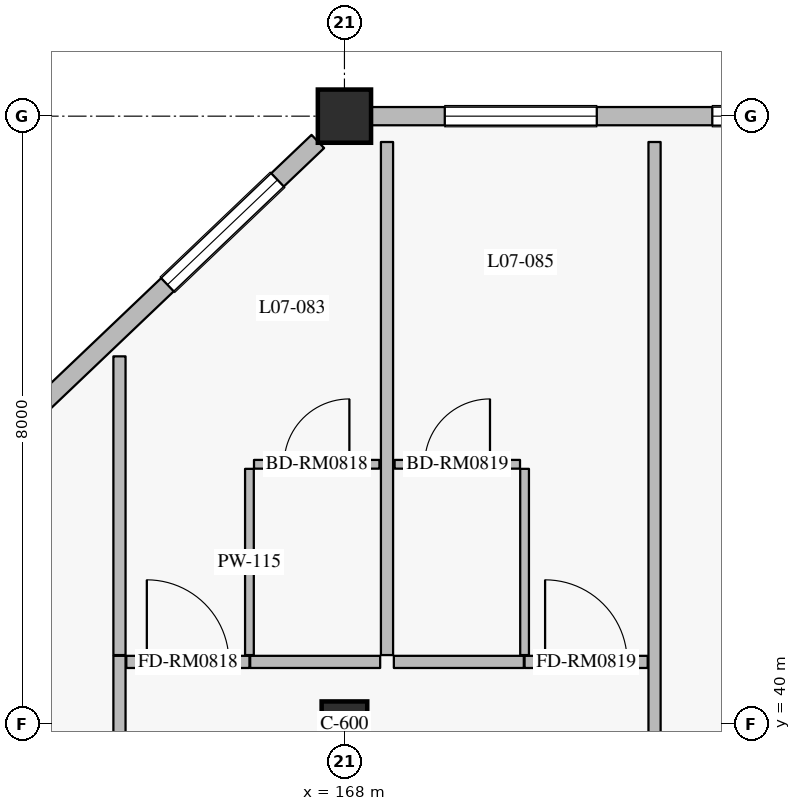
"""IFC4 building model, lengths in metres.
Left out: names, types, materials, properties, quantities, classifications, styles, units other than length and angle.
Written with IfcOpenShell. Run it as: python <this file> out.ifc"""

import sys

from ifc_helpers import new_model, si_unit, direction, frame, frame_2d, origin, origin_2d, place, context, subcontext, project, spatial, rectangle, extrude, element, fill, save


model = new_model("IFC4")
c1 = context("Model", 3, precision=1e-05, world=origin(), true_north=direction((0.0, 1.0)))
c2 = subcontext(c1, "Body", "Model", "MODEL_VIEW")
j1 = project(units=[si_unit("LENGTHUNIT", "METRE"), si_unit("PLANEANGLEUNIT", "RADIAN")], contexts=[c1])
p1 = place(None, origin())
s1 = spatial("IfcSite", under=j1, at=p1, CompositionType="ELEMENT")
p2 = place(p1, origin())
s2 = spatial("IfcBuilding", under=s1, at=p2, CompositionType="ELEMENT")
p3 = place(p2, frame((0.0, 0.0, 32.4)))
s3 = spatial("IfcBuildingStorey", under=s2, at=p3, CompositionType="ELEMENT", Elevation=32.4)
p4 = place(p3, frame((168.0, 48.0, 0.0), z_axis=(0.0, 0.0, 1.0), x_axis=(1.0, 0.0, 0.0)))
e1 = element("IfcColumn", 1, at=p4, inside=s3, PredefinedType="COLUMN", context=c2, shape_type="SweptSolid", body=[
    extrude(rectangle(XDim=0.7, YDim=0.7, at=origin_2d()), origin(), (0.0, 0.0, 1.0), 3.6),
])
p5 = place(p3, frame((168.0, 40.0, 0.0), z_axis=(0.0, 0.0, 1.0), x_axis=(1.0, 0.0, 0.0)))
e2 = element("IfcColumn", 2, at=p5, inside=s3, PredefinedType="COLUMN", context=c2, shape_type="SweptSolid", body=[
    extrude(rectangle(XDim=0.6, YDim=0.6, at=origin_2d()), origin(), (0.0, 0.0, 1.0), 3.6),
])
p6 = place(p3, frame((159.95, 40.333, 0.0), z_axis=(0.0, 0.0, 1.0), x_axis=(0.724105170588, 0.689689569247, 0.0)))
e3 = element("IfcWall", 3, at=p6, inside=s3, PredefinedType="SOLIDWALL", context=c2, shape_type="SweptSolid", body=[
    extrude(rectangle(XDim=10.634, YDim=0.24, at=frame_2d((5.317, 0.0))), origin(), (0.0, 0.0, 1.0), 2.89),
])
p7 = place(p6, frame((0.215, 0.0, 0.8)))
e4 = element("IfcOpeningElement", 4, at=p7, cuts=e3, PredefinedType="OPENING", context=c2, shape_type="SweptSolid", body=[
    extrude(rectangle(XDim=1.6, YDim=1.6, at=frame_2d((0.8, 0.8))), frame((0.0, 0.13, 0.0), z_axis=(0.0, -1.0, 0.0), x_axis=(1.0, 0.0, 0.0)), (0.0, 0.0, 1.0), 0.26),
])
p8 = place(p6, frame((3.599, 0.0, 0.8)))
e5 = element("IfcOpeningElement", 5, at=p8, cuts=e3, PredefinedType="OPENING", context=c2, shape_type="SweptSolid", body=[
    extrude(rectangle(XDim=2.0, YDim=1.75, at=frame_2d((1.0, 0.875))), frame((0.0, 0.13, 0.0), z_axis=(0.0, -1.0, 0.0), x_axis=(1.0, 0.0, 0.0)), (0.0, 0.0, 1.0), 0.26),
])
p9 = place(p6, frame((7.901, 0.0, 0.8)))
e6 = element("IfcOpeningElement", 6, at=p9, cuts=e3, PredefinedType="OPENING", context=c2, shape_type="SweptSolid", body=[
    extrude(rectangle(XDim=2.0, YDim=1.75, at=frame_2d((1.0, 0.875))), frame((0.0, 0.13, 0.0), z_axis=(0.0, -1.0, 0.0), x_axis=(1.0, 0.0, 0.0)), (0.0, 0.0, 1.0), 0.26),
])
p10 = place(p3, frame((168.35, 48.0, 0.0), z_axis=(0.0, 0.0, 1.0), x_axis=(1.0, 0.0, 0.0)))
e7 = element("IfcWall", 7, at=p10, inside=s3, PredefinedType="SOLIDWALL", context=c2, shape_type="SweptSolid", body=[
    extrude(rectangle(XDim=7.7, YDim=0.24, at=frame_2d((3.85, 0.0))), origin(), (0.0, 0.0, 1.0), 2.89),
])
p11 = place(p10, frame((0.97, 0.0, 0.8)))
e8 = element("IfcOpeningElement", 8, at=p11, cuts=e7, PredefinedType="OPENING", context=c2, shape_type="SweptSolid", body=[
    extrude(rectangle(XDim=2.0, YDim=1.75, at=frame_2d((1.0, 0.875))), frame((0.0, 0.13, 0.0), z_axis=(0.0, -1.0, 0.0), x_axis=(1.0, 0.0, 0.0)), (0.0, 0.0, 1.0), 0.26),
])
p12 = place(p10, frame((4.49, 0.0, 0.8)))
e9 = element("IfcOpeningElement", 9, at=p12, cuts=e7, PredefinedType="OPENING", context=c2, shape_type="SweptSolid", body=[
    extrude(rectangle(XDim=2.0, YDim=1.75, at=frame_2d((1.0, 0.875))), frame((0.0, 0.13, 0.0), z_axis=(0.0, -1.0, 0.0), x_axis=(1.0, 0.0, 0.0)), (0.0, 0.0, 1.0), 0.26),
])
p13 = place(p3, frame((165.04, 32.26, 0.0), z_axis=(0.0, 0.0, 1.0), x_axis=(0.0, 1.0, 0.0)))
e10 = element("IfcWall", 10, at=p13, inside=s3, PredefinedType="PARTITIONING", context=c2, shape_type="SweptSolid", body=[
    extrude(rectangle(XDim=8.64, YDim=0.16, at=frame_2d((4.32, 0.0))), origin(), (0.0, 0.0, 1.0), 3.335),
])
p14 = place(p3, frame((165.13, 40.82, 0.0), z_axis=(0.0, 0.0, 1.0), x_axis=(1.0, 0.0, 0.0)))
e11 = element("IfcWall", 11, at=p14, inside=s3, PredefinedType="PARTITIONING", context=c2, shape_type="SweptSolid", body=[
    extrude(rectangle(XDim=1.62, YDim=0.16, at=frame_2d((0.81, 0.0))), origin(), (0.0, 0.0, 1.0), 3.335),
])
p15 = place(p14, frame((0.27, 0.0, 0.0)))
e12 = element("IfcOpeningElement", 12, at=p15, cuts=e11, PredefinedType="OPENING", context=c2, shape_type="SweptSolid", body=[
    extrude(rectangle(XDim=1.08, YDim=2.3, at=frame_2d((0.54, 1.15))), frame((0.0, 0.09, 0.0), z_axis=(0.0, -1.0, 0.0), x_axis=(1.0, 0.0, 0.0)), (0.0, 0.0, 1.0), 0.18),
])
p16 = place(p3, frame((166.76, 40.82, 0.0), z_axis=(0.0, 0.0, 1.0), x_axis=(1.0, 0.0, 0.0)))
e13 = element("IfcWall", 13, at=p16, inside=s3, PredefinedType="PARTITIONING", context=c2, shape_type="SweptSolid", body=[
    extrude(rectangle(XDim=1.71, YDim=0.16, at=frame_2d((0.855, 0.0))), origin(), (0.0, 0.0, 1.0), 3.335),
])
p17 = place(p3, frame((166.75, 40.91, 0.0), z_axis=(0.0, 0.0, 1.0), x_axis=(0.0, 1.0, 0.0)))
e14 = element("IfcWall", 14, at=p17, inside=s3, PredefinedType="PARTITIONING", context=c2, shape_type="SweptSolid", body=[
    extrude(rectangle(XDim=2.45, YDim=0.115, at=frame_2d((1.225, 0.0))), origin(), (0.0, 0.0, 1.0), 3.335),
])
p18 = place(p3, frame((166.81, 43.42, 0.0), z_axis=(0.0, 0.0, 1.0), x_axis=(1.0, 0.0, 0.0)))
e15 = element("IfcWall", 15, at=p18, inside=s3, PredefinedType="PARTITIONING", context=c2, shape_type="SweptSolid", body=[
    extrude(rectangle(XDim=1.65, YDim=0.115, at=frame_2d((0.825, 0.0))), origin(), (0.0, 0.0, 1.0), 3.335),
])
p19 = place(p18, frame((0.395, 0.0, 0.0)))
e16 = element("IfcOpeningElement", 16, at=p19, cuts=e15, PredefinedType="OPENING", context=c2, shape_type="SweptSolid", body=[
    extrude(rectangle(XDim=0.86, YDim=2.12, at=frame_2d((0.43, 1.06))), frame((0.0, 0.067, 0.0), z_axis=(0.0, -1.0, 0.0), x_axis=(1.0, 0.0, 0.0)), (0.0, 0.0, 1.0), 0.135),
])
p20 = place(p3, frame((165.04, 40.91, 0.0), z_axis=(0.0, 0.0, 1.0), x_axis=(0.0, 1.0, 0.0)))
e17 = element("IfcWall", 17, at=p20, inside=s3, PredefinedType="PARTITIONING", context=c2, shape_type="SweptSolid", body=[
    extrude(rectangle(XDim=3.93, YDim=0.16, at=frame_2d((1.965, 0.0))), origin(), (0.0, 0.0, 1.0), 3.335),
])
p21 = place(p3, frame((168.65, 40.82, 0.0), z_axis=(0.0, 0.0, 1.0), x_axis=(1.0, 0.0, 0.0)))
e18 = element("IfcWall", 18, at=p21, inside=s3, PredefinedType="PARTITIONING", context=c2, shape_type="SweptSolid", body=[
    extrude(rectangle(XDim=1.71, YDim=0.16, at=frame_2d((0.855, 0.0))), origin(), (0.0, 0.0, 1.0), 3.335),
])
p22 = place(p3, frame((170.37, 40.82, 0.0), z_axis=(0.0, 0.0, 1.0), x_axis=(1.0, 0.0, 0.0)))
e19 = element("IfcWall", 19, at=p22, inside=s3, PredefinedType="PARTITIONING", context=c2, shape_type="SweptSolid", body=[
    extrude(rectangle(XDim=1.62, YDim=0.16, at=frame_2d((0.81, 0.0))), origin(), (0.0, 0.0, 1.0), 3.335),
])
p23 = place(p22, frame((0.27, 0.0, 0.0)))
e20 = element("IfcOpeningElement", 20, at=p23, cuts=e19, PredefinedType="OPENING", context=c2, shape_type="SweptSolid", body=[
    extrude(rectangle(XDim=1.08, YDim=2.3, at=frame_2d((0.54, 1.15))), frame((0.0, 0.09, 0.0), z_axis=(0.0, -1.0, 0.0), x_axis=(1.0, 0.0, 0.0)), (0.0, 0.0, 1.0), 0.18),
])
p24 = place(p3, frame((170.37, 40.91, 0.0), z_axis=(0.0, 0.0, 1.0), x_axis=(0.0, 1.0, 0.0)))
e21 = element("IfcWall", 21, at=p24, inside=s3, PredefinedType="PARTITIONING", context=c2, shape_type="SweptSolid", body=[
    extrude(rectangle(XDim=2.45, YDim=0.115, at=frame_2d((1.225, 0.0))), origin(), (0.0, 0.0, 1.0), 3.335),
])
p25 = place(p3, frame((168.66, 43.42, 0.0), z_axis=(0.0, 0.0, 1.0), x_axis=(1.0, 0.0, 0.0)))
e22 = element("IfcWall", 22, at=p25, inside=s3, PredefinedType="PARTITIONING", context=c2, shape_type="SweptSolid", body=[
    extrude(rectangle(XDim=1.65, YDim=0.115, at=frame_2d((0.825, 0.0))), origin(), (0.0, 0.0, 1.0), 3.335),
])
p26 = place(p25, frame((0.395, 0.0, 0.0)))
e23 = element("IfcOpeningElement", 23, at=p26, cuts=e22, PredefinedType="OPENING", context=c2, shape_type="SweptSolid", body=[
    extrude(rectangle(XDim=0.86, YDim=2.12, at=frame_2d((0.43, 1.06))), frame((0.0, 0.067, 0.0), z_axis=(0.0, -1.0, 0.0), x_axis=(1.0, 0.0, 0.0)), (0.0, 0.0, 1.0), 0.135),
])
p27 = place(p3, frame((168.56, 40.91, 0.0), z_axis=(0.0, 0.0, 1.0), x_axis=(0.0, 1.0, 0.0)))
e24 = element("IfcWall", 24, at=p27, inside=s3, PredefinedType="PARTITIONING", context=c2, shape_type="SweptSolid", body=[
    extrude(rectangle(XDim=6.75, YDim=0.16, at=frame_2d((3.375, 0.0))), origin(), (0.0, 0.0, 1.0), 3.335),
])
p28 = place(p3, frame((172.08, 38.75, 0.0), z_axis=(0.0, 0.0, 1.0), x_axis=(0.0, 1.0, 0.0)))
e25 = element("IfcWall", 25, at=p28, inside=s3, PredefinedType="PARTITIONING", context=c2, shape_type="SweptSolid", body=[
    extrude(rectangle(XDim=8.91, YDim=0.16, at=frame_2d((4.455, 0.0))), origin(), (0.0, 0.0, 1.0), 3.335),
])
p29 = place(p9, origin())
e26 = element("IfcWindow", 26, at=p29, inside=s3, PartitioningType="DOUBLE_PANEL_VERTICAL", PredefinedType="WINDOW", context=c2, shape_type="SweptSolid", body=[
    extrude(rectangle(XDim=2.0, YDim=1.75, at=frame_2d((1.0, 0.875))), frame((0.0, 0.03, 0.0), z_axis=(0.0, -1.0, 0.0), x_axis=(1.0, 0.0, 0.0)), (0.0, 0.0, 1.0), 0.06),
])
fill(e6, e26)
p30 = place(p11, origin())
e27 = element("IfcWindow", 27, at=p30, inside=s3, PartitioningType="DOUBLE_PANEL_VERTICAL", PredefinedType="WINDOW", context=c2, shape_type="SweptSolid", body=[
    extrude(rectangle(XDim=2.0, YDim=1.75, at=frame_2d((1.0, 0.875))), frame((0.0, 0.03, 0.0), z_axis=(0.0, -1.0, 0.0), x_axis=(1.0, 0.0, 0.0)), (0.0, 0.0, 1.0), 0.06),
])
fill(e8, e27)
p31 = place(p12, origin())
e28 = element("IfcWindow", 28, at=p31, inside=s3, PartitioningType="DOUBLE_PANEL_VERTICAL", PredefinedType="WINDOW", context=c2, shape_type="SweptSolid", body=[
    extrude(rectangle(XDim=2.0, YDim=1.75, at=frame_2d((1.0, 0.875))), frame((0.0, 0.03, 0.0), z_axis=(0.0, -1.0, 0.0), x_axis=(1.0, 0.0, 0.0)), (0.0, 0.0, 1.0), 0.06),
])
fill(e9, e28)
p32 = place(p15, origin())
e29 = element("IfcDoor", 29, at=p32, inside=s3, OperationType="SINGLE_SWING_LEFT", PredefinedType="DOOR", context=c2, shape_type="SweptSolid", body=[
    extrude(rectangle(XDim=1.08, YDim=2.3, at=frame_2d((0.54, 1.15))), frame((0.0, 0.025, 0.0), z_axis=(0.0, -1.0, 0.0), x_axis=(1.0, 0.0, 0.0)), (0.0, 0.0, 1.0), 0.05),
])
fill(e12, e29)
p33 = place(p19, origin())
e30 = element("IfcDoor", 30, at=p33, inside=s3, OperationType="SINGLE_SWING_RIGHT", PredefinedType="DOOR", context=c2, shape_type="SweptSolid", body=[
    extrude(rectangle(XDim=0.86, YDim=2.12, at=frame_2d((0.43, 1.06))), frame((0.0, 0.025, 0.0), z_axis=(0.0, -1.0, 0.0), x_axis=(1.0, 0.0, 0.0)), (0.0, 0.0, 1.0), 0.05),
])
fill(e16, e30)
p34 = place(p23, origin())
e31 = element("IfcDoor", 31, at=p34, inside=s3, OperationType="SINGLE_SWING_LEFT", PredefinedType="DOOR", context=c2, shape_type="SweptSolid", body=[
    extrude(rectangle(XDim=1.08, YDim=2.3, at=frame_2d((0.54, 1.15))), frame((0.0, 0.025, 0.0), z_axis=(0.0, -1.0, 0.0), x_axis=(1.0, 0.0, 0.0)), (0.0, 0.0, 1.0), 0.05),
])
fill(e20, e31)
p35 = place(p26, origin())
e32 = element("IfcDoor", 32, at=p35, inside=s3, OperationType="SINGLE_SWING_RIGHT", PredefinedType="DOOR", context=c2, shape_type="SweptSolid", body=[
    extrude(rectangle(XDim=0.86, YDim=2.12, at=frame_2d((0.43, 1.06))), frame((0.0, 0.025, 0.0), z_axis=(0.0, -1.0, 0.0), x_axis=(1.0, 0.0, 0.0)), (0.0, 0.0, 1.0), 0.05),
])
fill(e23, e32)
save(model, sys.argv[1])
